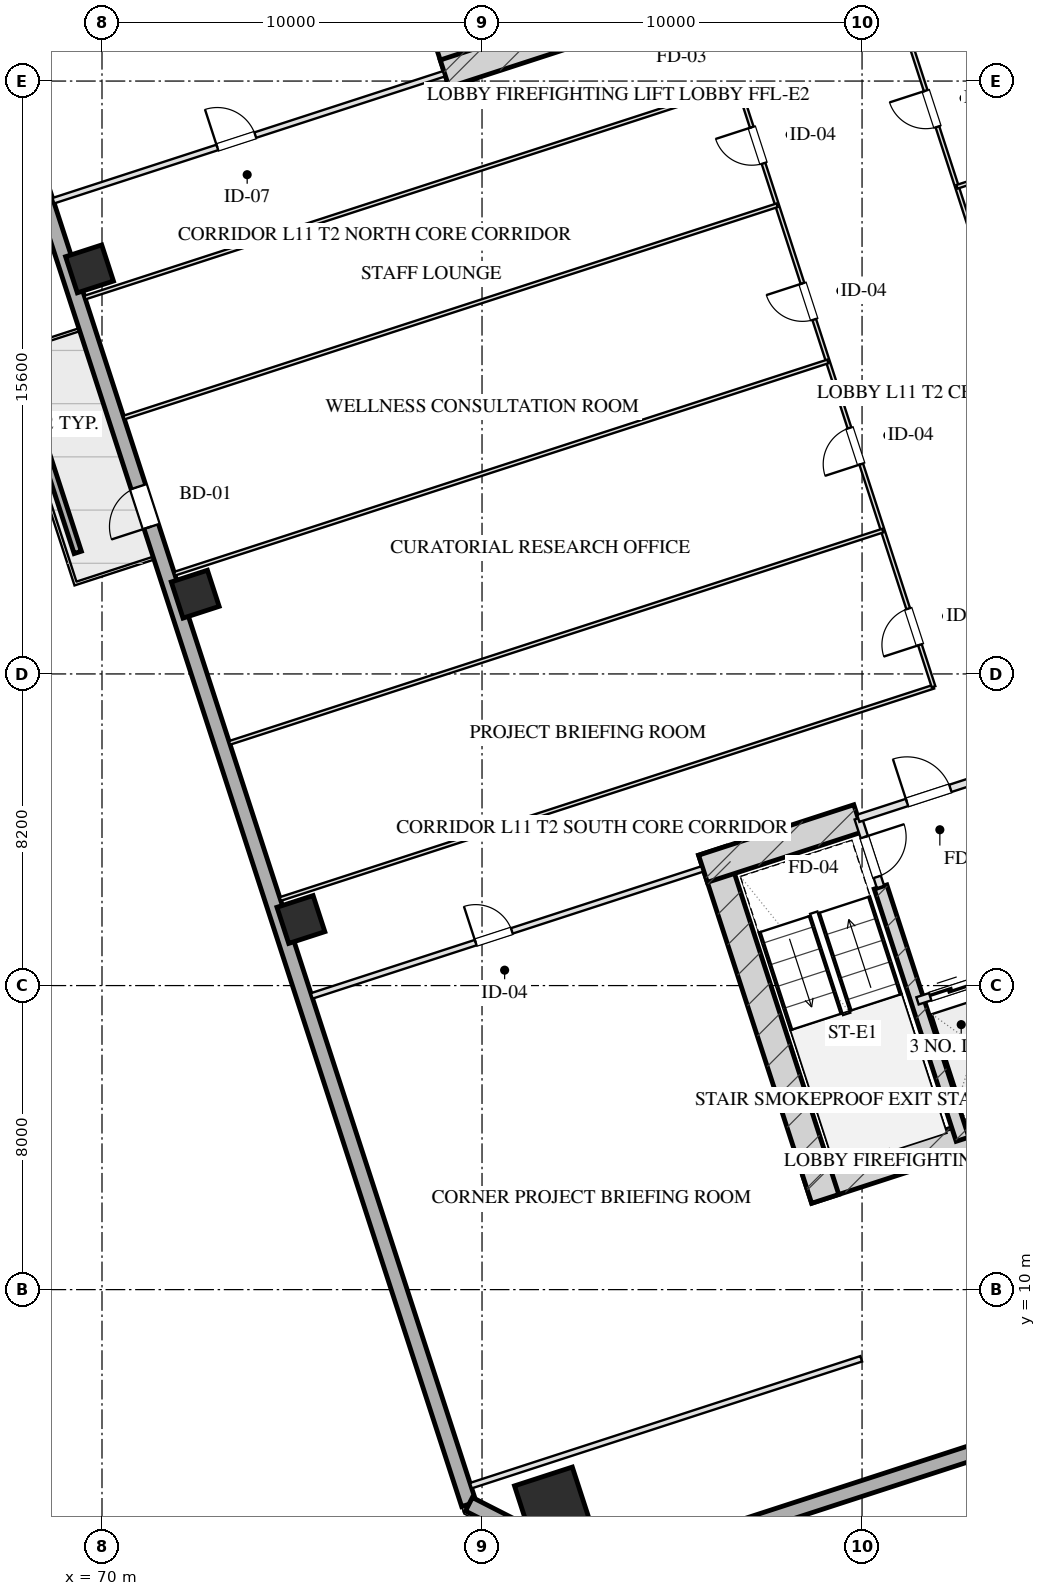
"""IFC4 building model, lengths in metres.
Left out: names, types, materials, properties, quantities, classifications, styles, units other than length and angle.
Written with IfcOpenShell. Run it as: python <this file> out.ifc"""

import sys

from ifc_helpers import new_model, si_unit, direction, frame, frame_2d, origin, origin_2d, place, context, subcontext, project, spatial, rectangle, hollow_rectangle, extrude, element, fill, save


model = new_model("IFC4")
c1 = context("Model", 3, precision=1e-05, world=origin(), true_north=direction((0.0, 1.0)))
c2 = subcontext(c1, "Body", "Model", "MODEL_VIEW")
j1 = project(units=[si_unit("LENGTHUNIT", "METRE"), si_unit("PLANEANGLEUNIT", "RADIAN")], contexts=[c1])
p1 = place(None, origin())
s1 = spatial("IfcSite", under=j1, at=p1, CompositionType="ELEMENT")
p2 = place(p1, origin())
s2 = spatial("IfcBuilding", under=s1, at=p2, CompositionType="ELEMENT")
p3 = place(p2, frame((0.0, 0.0, 50.6)))
s3 = spatial("IfcBuildingStorey", under=s2, at=p3, CompositionType="ELEMENT", Elevation=50.6)
p4 = place(p3, frame((88.559, 12.629, 0.0), z_axis=(0.0, 0.0, 1.0), x_axis=(0.951056072937, 0.309018358888, 0.0)))
e1 = element("IfcWall", 1, at=p4, inside=s3, PredefinedType="SHEAR", context=c2, shape_type="SweptSolid", body=[
    extrude(rectangle(XDim=16.55, YDim=0.75, at=frame_2d((8.275, 0.0))), origin(), (0.0, 0.0, 1.0), 3.45),
])
p5 = place(p3, frame((86.055, 21.546, 0.0), z_axis=(0.0, 0.0, 1.0), x_axis=(0.309023585745, -0.951054374604, 0.0)))
e2 = element("IfcWall", 2, at=p5, inside=s3, PredefinedType="SHEAR", context=c2, shape_type="SweptSolid", body=[
    extrude(rectangle(XDim=9.63, YDim=0.75, at=frame_2d((4.815, 0.0))), origin(), (0.0, 0.0, 1.0), 3.45),
])
p6 = place(p3, frame((90.486, 20.594, 0.0), z_axis=(0.0, 0.0, 1.0), x_axis=(0.309020428229, -0.951055400562, 0.0)))
e3 = element("IfcWall", 3, at=p6, inside=s3, PredefinedType="SHEAR", context=c2, shape_type="SweptSolid", body=[
    extrude(rectangle(XDim=6.98, YDim=0.35, at=frame_2d((3.49, 0.0))), origin(), (0.0, 0.0, 1.0), 3.45),
])
p7 = place(p3, frame((85.814, 21.074, 0.0), z_axis=(0.0, 0.0, 1.0), x_axis=(0.95106580992, 0.308988390074, 0.0)))
e4 = element("IfcWall", 4, at=p7, inside=s3, PredefinedType="SHEAR", context=c2, shape_type="SweptSolid", body=[
    extrude(rectangle(XDim=4.295, YDim=0.75, at=frame_2d((2.147, 0.0))), origin(), (0.0, 0.0, 1.0), 3.45),
])
p8 = place(p3, frame((79.489, 41.756, 0.0), z_axis=(0.0, 0.0, 1.0), x_axis=(-0.309016134813, 0.951056795583, 0.0)))
e5 = element("IfcWall", 5, at=p8, inside=s3, PredefinedType="SHEAR", context=c2, shape_type="SweptSolid", body=[
    extrude(rectangle(XDim=9.63, YDim=0.75, at=frame_2d((4.815, 0.0))), origin(), (0.0, 0.0, 1.0), 3.45),
])
p9 = place(p3, frame((79.016, 41.997, 0.0), z_axis=(0.0, 0.0, 1.0), x_axis=(0.95106038264, 0.309005094736, 0.0)))
e6 = element("IfcWall", 6, at=p9, inside=s3, PredefinedType="SHEAR", context=c2, shape_type="SweptSolid", body=[
    extrude(rectangle(XDim=4.295, YDim=0.75, at=frame_2d((2.147, 0.0))), origin(), (0.0, 0.0, 1.0), 3.45),
])
p10 = place(p3, frame((81.863, 4.323, 0.0), z_axis=(0.0, 0.0, 1.0), x_axis=(0.951056516295, 0.309016994375, 0.0)))
e7 = element("IfcColumn", 7, at=p10, inside=s3, PredefinedType="COLUMN", context=c2, shape_type="SweptSolid", body=[
    extrude(hollow_rectangle(XDim=1.6, YDim=1.6, WallThickness=0.055, at=origin_2d()), origin(), (0.0, 0.0, 1.0), 3.451),
])
for number, where, z_axis, x_axis in (
    (8, (75.234, 19.739, 0.0), (0.0, 0.0, 1.0), (0.951, 0.309, 0.0)),
    (9, (72.453, 28.299, 0.0), (0.0, 0.0, 1.0), (0.951, 0.309, 0.0)),
    (10, (69.672, 36.858, 0.0), (0.0, 0.0, 1.0), (0.951, 0.309, 0.0)),
):
    element("IfcColumn", number, at=place(p3, frame(where, z_axis=z_axis, x_axis=x_axis)), inside=s3, PredefinedType="COLUMN", context=c2, shape_type="SweptSolid", body=[
        extrude(hollow_rectangle(XDim=1.0, YDim=1.0, WallThickness=0.036, at=origin_2d()), origin(), (0.0, 0.0, 1.0), 3.451),
    ])
p11 = place(p3, frame((79.655, 4.352, 0.0), z_axis=(0.0, 0.0, 1.0), x_axis=(-0.309014526607, 0.951057318118, 0.0)))
e11 = element("IfcWall", 11, at=p11, inside=s3, PredefinedType="SOLIDWALL", context=c2, shape_type="SweptSolid", body=[
    extrude(rectangle(XDim=50.0, YDim=0.4, at=frame_2d((25.0, 0.0))), origin(), (0.0, 0.0, 1.0), 2.61),
])
p12 = place(p11, frame((27.05, 0.0, 0.0)))
e12 = element("IfcOpeningElement", 12, at=p12, cuts=e11, PredefinedType="OPENING", context=c2, shape_type="SweptSolid", body=[
    extrude(rectangle(XDim=1.1, YDim=2.15, at=frame_2d((0.55, 1.075))), frame((0.0, 0.21, 0.0), z_axis=(0.0, -1.0, 0.0), x_axis=(1.0, 0.0, 0.0)), (0.0, 0.0, 1.0), 0.42),
])
p13 = place(p3, frame((113.998, 12.567, 0.0), z_axis=(0.0, 0.0, 1.0), x_axis=(-0.951055939317, -0.309018770125, 0.0)))
e13 = element("IfcWall", 13, at=p13, inside=s3, PredefinedType="SOLIDWALL", context=c2, shape_type="SweptSolid", body=[
    extrude(rectangle(XDim=32.4, YDim=0.4, at=frame_2d((16.2, 0.0))), origin(), (0.0, 0.0, 1.0), 2.61),
])
p14 = place(p3, frame((83.184, 2.554, 0.0), z_axis=(0.0, 0.0, 1.0), x_axis=(-0.890998089617, 0.454007053137, 0.0)))
e14 = element("IfcWall", 14, at=p14, inside=s3, PredefinedType="SOLIDWALL", context=c2, shape_type="SweptSolid", body=[
    extrude(rectangle(XDim=3.96, YDim=0.4, at=frame_2d((1.98, 0.0))), origin(), (0.0, 0.0, 1.0), 2.61),
])
p15 = place(p3, frame((69.362, 29.397, 0.0), z_axis=(0.0, 0.0, 1.0), x_axis=(-0.309032019345, 0.951051634255, 0.0)))
e15 = element("IfcWall", 15, at=p15, inside=s3, PredefinedType="PARAPET", context=c2, shape_type="SweptSolid", body=[
    extrude(rectangle(XDim=4.8, YDim=0.2, at=frame_2d((2.4, 0.0))), origin(), (0.0, 0.0, 1.0), 0.75),
])
p16 = place(p3, frame((89.899, 22.401, 0.0), z_axis=(0.0, 0.0, 1.0), x_axis=(0.308932062672, -0.951084108086, 0.0)))
e16 = element("IfcWall", 16, at=p16, inside=s3, PredefinedType="PARTITIONING", context=c2, shape_type="SweptSolid", body=[
    extrude(rectangle(XDim=1.9, YDim=0.2, at=frame_2d((0.95, 0.0))), origin(), (0.0, 0.0, 1.0), 3.175),
])
p17 = place(p16, frame((0.52, 0.0, 0.0)))
e17 = element("IfcOpeningElement", 17, at=p17, cuts=e16, PredefinedType="OPENING", context=c2, shape_type="SweptSolid", body=[
    extrude(rectangle(XDim=1.1, YDim=2.05, at=frame_2d((0.55, 1.025))), frame((0.0, 0.11, 0.0), z_axis=(0.0, -1.0, 0.0), x_axis=(1.0, 0.0, 0.0)), (0.0, 0.0, 1.0), 0.22),
])
p18 = place(p3, frame((89.899, 22.401, 0.0), z_axis=(0.0, 0.0, 1.0), x_axis=(0.951046716504, 0.309047153403, 0.0)))
e18 = element("IfcWall", 18, at=p18, inside=s3, PredefinedType="PARTITIONING", context=c2, shape_type="SweptSolid", body=[
    extrude(rectangle(XDim=3.83, YDim=0.2, at=frame_2d((1.915, 0.0))), origin(), (0.0, 0.0, 1.0), 3.175),
])
p19 = place(p18, frame((1.35, 0.0, 0.0)))
e19 = element("IfcOpeningElement", 19, at=p19, cuts=e18, PredefinedType="OPENING", context=c2, shape_type="SweptSolid", body=[
    extrude(rectangle(XDim=1.2, YDim=2.05, at=frame_2d((0.6, 1.025))), frame((0.0, 0.11, 0.0), z_axis=(0.0, -1.0, 0.0), x_axis=(1.0, 0.0, 0.0)), (0.0, 0.0, 1.0), 0.22),
])
p20 = place(p3, frame((91.46, 17.598, 0.0), z_axis=(0.0, 0.0, 1.0), x_axis=(0.951062257173, 0.308999325213, 0.0)))
e20 = element("IfcWall", 20, at=p20, inside=s3, PredefinedType="PARTITIONING", context=c2, shape_type="SweptSolid", body=[
    extrude(rectangle(XDim=2.1, YDim=0.2, at=frame_2d((1.05, 0.0))), origin(), (0.0, 0.0, 1.0), 3.175),
])
p21 = place(p20, frame((0.35, 0.0, 0.0)))
e21 = element("IfcOpeningElement", 21, at=p21, cuts=e20, PredefinedType="OPENING", context=c2, shape_type="SweptSolid", body=[
    extrude(rectangle(XDim=1.1, YDim=2.05, at=frame_2d((0.55, 1.025))), frame((0.0, 0.11, 0.0), z_axis=(0.0, -1.0, 0.0), x_axis=(1.0, 0.0, 0.0)), (0.0, 0.0, 1.0), 0.22),
])
p22 = place(p3, frame((79.707, 4.842, 0.0), z_axis=(0.0, 0.0, 1.0), x_axis=(0.951056658866, 0.309016555588, 0.0)))
e22 = element("IfcWall", 22, at=p22, inside=s3, PredefinedType="PARTITIONING", context=c2, shape_type="SweptSolid", body=[
    extrude(rectangle(XDim=10.8, YDim=0.15, at=frame_2d((5.4, 0.0))), origin(), (0.0, 0.0, 1.0), 3.175),
])
p23 = place(p3, frame((75.519, 17.729, 0.0), z_axis=(0.0, 0.0, 1.0), x_axis=(0.951056658866, 0.309016555588, 0.0)))
e23 = element("IfcWall", 23, at=p23, inside=s3, PredefinedType="PARTITIONING", context=c2, shape_type="SweptSolid", body=[
    extrude(rectangle(XDim=10.8, YDim=0.15, at=frame_2d((5.4, 0.0))), origin(), (0.0, 0.0, 1.0), 3.175),
])
p24 = place(p23, frame((4.536, 0.0, 0.0)))
e24 = element("IfcOpeningElement", 24, at=p24, cuts=e23, PredefinedType="OPENING", context=c2, shape_type="SweptSolid", body=[
    extrude(rectangle(XDim=1.0, YDim=2.05, at=frame_2d((0.5, 1.025))), frame((0.0, 0.085, 0.0), z_axis=(0.0, -1.0, 0.0), x_axis=(1.0, 0.0, 0.0)), (0.0, 0.0, 1.0), 0.17),
])
p25 = place(p3, frame((68.721, 38.652, 0.0), z_axis=(0.0, 0.0, 1.0), x_axis=(0.951056658866, 0.309016555588, 0.0)))
e25 = element("IfcWall", 25, at=p25, inside=s3, PredefinedType="PARTITIONING", context=c2, shape_type="SweptSolid", body=[
    extrude(rectangle(XDim=10.8, YDim=0.15, at=frame_2d((5.4, 0.0))), origin(), (0.0, 0.0, 1.0), 3.175),
])
p26 = place(p25, frame((4.536, 0.0, 0.0)))
e26 = element("IfcOpeningElement", 26, at=p26, cuts=e25, PredefinedType="OPENING", context=c2, shape_type="SweptSolid", body=[
    extrude(rectangle(XDim=1.05, YDim=2.05, at=frame_2d((0.525, 1.025))), frame((0.0, 0.085, 0.0), z_axis=(0.0, -1.0, 0.0), x_axis=(1.0, 0.0, 0.0)), (0.0, 0.0, 1.0), 0.17),
])
p27 = place(p3, frame((74.691, 20.278, 0.0), z_axis=(0.0, 0.0, 1.0), x_axis=(0.951053521786, 0.309026210375, 0.0)))
e27 = element("IfcWall", 27, at=p27, inside=s3, PredefinedType="MOVABLE", context=c2, shape_type="SweptSolid", body=[
    extrude(rectangle(XDim=18.075, YDim=0.1, at=frame_2d((9.038, 0.0))), origin(), (0.0, 0.0, 1.0), 3.175),
])
p28 = place(p3, frame((69.549, 36.103, 0.0), z_axis=(0.0, 0.0, 1.0), x_axis=(0.951057491432, 0.309013993197, 0.0)))
e28 = element("IfcWall", 28, at=p28, inside=s3, PredefinedType="MOVABLE", context=c2, shape_type="SweptSolid", body=[
    extrude(rectangle(XDim=18.075, YDim=0.1, at=frame_2d((9.038, 0.0))), origin(), (0.0, 0.0, 1.0), 3.175),
])
p29 = place(p3, frame((91.882, 25.863, 0.0), z_axis=(0.0, 0.0, 1.0), x_axis=(-0.309022042254, 0.951054876125, 0.0)))
e29 = element("IfcWall", 29, at=p29, inside=s3, PredefinedType="MOVABLE", context=c2, shape_type="SweptSolid", body=[
    extrude(rectangle(XDim=16.64, YDim=0.1, at=frame_2d((8.32, 0.0))), origin(), (0.0, 0.0, 1.0), 3.175),
])
p30 = place(p29, frame((1.16, 0.0, 0.0)))
e30 = element("IfcOpeningElement", 30, at=p30, cuts=e29, PredefinedType="OPENING", context=c2, shape_type="SweptSolid", body=[
    extrude(rectangle(XDim=1.0, YDim=2.05, at=frame_2d((0.5, 1.025))), frame((0.0, 0.06, 0.0), z_axis=(0.0, -1.0, 0.0), x_axis=(1.0, 0.0, 0.0)), (0.0, 0.0, 1.0), 0.12),
])
p31 = place(p29, frame((6.16, 0.0, 0.0)))
e31 = element("IfcOpeningElement", 31, at=p31, cuts=e29, PredefinedType="OPENING", context=c2, shape_type="SweptSolid", body=[
    extrude(rectangle(XDim=1.0, YDim=2.05, at=frame_2d((0.5, 1.025))), frame((0.0, 0.06, 0.0), z_axis=(0.0, -1.0, 0.0), x_axis=(1.0, 0.0, 0.0)), (0.0, 0.0, 1.0), 0.12),
])
p32 = place(p29, frame((10.16, 0.0, 0.0)))
e32 = element("IfcOpeningElement", 32, at=p32, cuts=e29, PredefinedType="OPENING", context=c2, shape_type="SweptSolid", body=[
    extrude(rectangle(XDim=1.0, YDim=2.05, at=frame_2d((0.5, 1.025))), frame((0.0, 0.06, 0.0), z_axis=(0.0, -1.0, 0.0), x_axis=(1.0, 0.0, 0.0)), (0.0, 0.0, 1.0), 0.12),
])
p33 = place(p29, frame((14.48, 0.0, 0.0)))
e33 = element("IfcOpeningElement", 33, at=p33, cuts=e29, PredefinedType="OPENING", context=c2, shape_type="SweptSolid", body=[
    extrude(rectangle(XDim=1.0, YDim=2.05, at=frame_2d((0.5, 1.025))), frame((0.0, 0.06, 0.0), z_axis=(0.0, -1.0, 0.0), x_axis=(1.0, 0.0, 0.0)), (0.0, 0.0, 1.0), 0.12),
])
p34 = place(p3, frame((96.304, 27.3, 0.0), z_axis=(0.0, 0.0, 1.0), x_axis=(-0.30901773025, 0.951056277195, 0.0)))
e34 = element("IfcWall", 34, at=p34, inside=s3, PredefinedType="MOVABLE", context=c2, shape_type="SweptSolid", body=[
    extrude(rectangle(XDim=16.64, YDim=0.1, at=frame_2d((8.32, 0.0))), origin(), (0.0, 0.0, 1.0), 3.175),
])
p35 = place(p34, frame((1.66, 0.0, 0.0)))
e35 = element("IfcOpeningElement", 35, at=p35, cuts=e34, PredefinedType="OPENING", context=c2, shape_type="SweptSolid", body=[
    extrude(rectangle(XDim=1.0, YDim=2.05, at=frame_2d((0.5, 1.025))), frame((0.0, 0.06, 0.0), z_axis=(0.0, -1.0, 0.0), x_axis=(1.0, 0.0, 0.0)), (0.0, 0.0, 1.0), 0.12),
])
p36 = place(p34, frame((7.82, 0.0, 0.0)))
e36 = element("IfcOpeningElement", 36, at=p36, cuts=e34, PredefinedType="OPENING", context=c2, shape_type="SweptSolid", body=[
    extrude(rectangle(XDim=1.05, YDim=2.05, at=frame_2d((0.525, 1.025))), frame((0.0, 0.06, 0.0), z_axis=(0.0, -1.0, 0.0), x_axis=(1.0, 0.0, 0.0)), (0.0, 0.0, 1.0), 0.12),
])
p37 = place(p34, frame((13.98, 0.0, 0.0)))
e37 = element("IfcOpeningElement", 37, at=p37, cuts=e34, PredefinedType="OPENING", context=c2, shape_type="SweptSolid", body=[
    extrude(rectangle(XDim=1.0, YDim=2.05, at=frame_2d((0.5, 1.025))), frame((0.0, 0.06, 0.0), z_axis=(0.0, -1.0, 0.0), x_axis=(1.0, 0.0, 0.0)), (0.0, 0.0, 1.0), 0.12),
])
for number, where, z_axis, x_axis in (
    (38, (73.356, 24.386, 0.0), (0.0, 0.0, 1.0), (0.951, 0.309, 0.0)),
    (39, (71.91, 28.837, 0.0), (0.0, 0.0, 1.0), (0.951, 0.309, 0.0)),
    (40, (70.575, 32.946, 0.0), (0.0, 0.0, 1.0), (0.951, 0.309, 0.0)),
):
    element("IfcWall", number, at=place(p3, frame(where, z_axis=z_axis, x_axis=x_axis)), inside=s3, PredefinedType="MOVABLE", context=c2, shape_type="SweptSolid", body=[
        extrude(rectangle(XDim=18.075, YDim=0.1, at=frame_2d((9.038, 0.0))), origin(), (0.0, 0.0, 1.0), 3.175),
    ])
p38 = place(p3, frame((92.497, 39.017, 0.0), z_axis=(0.0, 0.0, 1.0), x_axis=(0.951055535739, 0.309020012199, 0.0)))
e41 = element("IfcWall", 41, at=p38, inside=s3, PredefinedType="MOVABLE", context=c2, shape_type="SweptSolid", body=[
    extrude(rectangle(XDim=14.875, YDim=0.1, at=frame_2d((7.438, 0.0))), origin(), (0.0, 0.0, 1.0), 3.175),
])
p39 = place(p12, origin())
e42 = element("IfcDoor", 42, at=p39, inside=s3, OperationType="SINGLE_SWING_LEFT", PredefinedType="DOOR", context=c2, shape_type="SweptSolid", body=[
    extrude(rectangle(XDim=1.1, YDim=2.15, at=frame_2d((0.55, 1.075))), frame((0.0, 0.025, 0.0), z_axis=(0.0, -1.0, 0.0), x_axis=(1.0, 0.0, 0.0)), (0.0, 0.0, 1.0), 0.05),
])
fill(e12, e42)
p40 = place(p17, origin())
e43 = element("IfcDoor", 43, at=p40, inside=s3, OperationType="SINGLE_SWING_LEFT", PredefinedType="DOOR", context=c2, shape_type="SweptSolid", body=[
    extrude(rectangle(XDim=1.1, YDim=2.05, at=frame_2d((0.55, 1.025))), frame((0.0, 0.025, 0.0), z_axis=(0.0, -1.0, 0.0), x_axis=(1.0, 0.0, 0.0)), (0.0, 0.0, 1.0), 0.05),
])
fill(e17, e43)
p41 = place(p19, origin())
e44 = element("IfcDoor", 44, at=p41, inside=s3, OperationType="SINGLE_SWING_LEFT", PredefinedType="DOOR", context=c2, shape_type="SweptSolid", body=[
    extrude(rectangle(XDim=1.2, YDim=2.05, at=frame_2d((0.6, 1.025))), frame((0.0, 0.025, 0.0), z_axis=(0.0, -1.0, 0.0), x_axis=(1.0, 0.0, 0.0)), (0.0, 0.0, 1.0), 0.05),
])
fill(e19, e44)
p42 = place(p21, origin())
e45 = element("IfcDoor", 45, at=p42, inside=s3, OperationType="DOUBLE_DOOR_SLIDING", PredefinedType="DOOR", context=c2, shape_type="SweptSolid", body=[
    extrude(rectangle(XDim=1.1, YDim=2.05, at=frame_2d((0.55, 1.025))), frame((0.0, 0.025, 0.0), z_axis=(0.0, -1.0, 0.0), x_axis=(1.0, 0.0, 0.0)), (0.0, 0.0, 1.0), 0.05),
])
fill(e21, e45)
p43 = place(p24, origin())
e46 = element("IfcDoor", 46, at=p43, inside=s3, OperationType="SINGLE_SWING_LEFT", PredefinedType="DOOR", context=c2, shape_type="SweptSolid", body=[
    extrude(rectangle(XDim=1.0, YDim=2.05, at=frame_2d((0.5, 1.025))), frame((0.0, 0.025, 0.0), z_axis=(0.0, -1.0, 0.0), x_axis=(1.0, 0.0, 0.0)), (0.0, 0.0, 1.0), 0.05),
])
fill(e24, e46)
p44 = place(p26, origin())
e47 = element("IfcDoor", 47, at=p44, inside=s3, OperationType="SINGLE_SWING_LEFT", PredefinedType="DOOR", context=c2, shape_type="SweptSolid", body=[
    extrude(rectangle(XDim=1.05, YDim=2.05, at=frame_2d((0.525, 1.025))), frame((0.0, 0.025, 0.0), z_axis=(0.0, -1.0, 0.0), x_axis=(1.0, 0.0, 0.0)), (0.0, 0.0, 1.0), 0.05),
])
fill(e26, e47)
p45 = place(p30, origin())
e48 = element("IfcDoor", 48, at=p45, inside=s3, OperationType="SINGLE_SWING_LEFT", PredefinedType="DOOR", context=c2, shape_type="SweptSolid", body=[
    extrude(rectangle(XDim=1.0, YDim=2.05, at=frame_2d((0.5, 1.025))), frame((0.0, 0.025, 0.0), z_axis=(0.0, -1.0, 0.0), x_axis=(1.0, 0.0, 0.0)), (0.0, 0.0, 1.0), 0.05),
])
fill(e30, e48)
p46 = place(p31, origin())
e49 = element("IfcDoor", 49, at=p46, inside=s3, OperationType="SINGLE_SWING_LEFT", PredefinedType="DOOR", context=c2, shape_type="SweptSolid", body=[
    extrude(rectangle(XDim=1.0, YDim=2.05, at=frame_2d((0.5, 1.025))), frame((0.0, 0.025, 0.0), z_axis=(0.0, -1.0, 0.0), x_axis=(1.0, 0.0, 0.0)), (0.0, 0.0, 1.0), 0.05),
])
fill(e31, e49)
p47 = place(p32, origin())
e50 = element("IfcDoor", 50, at=p47, inside=s3, OperationType="SINGLE_SWING_RIGHT", PredefinedType="DOOR", context=c2, shape_type="SweptSolid", body=[
    extrude(rectangle(XDim=1.0, YDim=2.05, at=frame_2d((0.5, 1.025))), frame((0.0, 0.025, 0.0), z_axis=(0.0, -1.0, 0.0), x_axis=(1.0, 0.0, 0.0)), (0.0, 0.0, 1.0), 0.05),
])
fill(e32, e50)
p48 = place(p33, origin())
e51 = element("IfcDoor", 51, at=p48, inside=s3, OperationType="SINGLE_SWING_RIGHT", PredefinedType="DOOR", context=c2, shape_type="SweptSolid", body=[
    extrude(rectangle(XDim=1.0, YDim=2.05, at=frame_2d((0.5, 1.025))), frame((0.0, 0.025, 0.0), z_axis=(0.0, -1.0, 0.0), x_axis=(1.0, 0.0, 0.0)), (0.0, 0.0, 1.0), 0.05),
])
fill(e33, e51)
p49 = place(p37, origin())
e52 = element("IfcDoor", 52, at=p49, inside=s3, OperationType="SINGLE_SWING_RIGHT", PredefinedType="DOOR", context=c2, shape_type="SweptSolid", body=[
    extrude(rectangle(XDim=1.0, YDim=2.05, at=frame_2d((0.5, 1.025))), frame((0.0, 0.025, 0.0), z_axis=(0.0, -1.0, 0.0), x_axis=(1.0, 0.0, 0.0)), (0.0, 0.0, 1.0), 0.05),
])
fill(e37, e52)
save(model, sys.argv[1])
